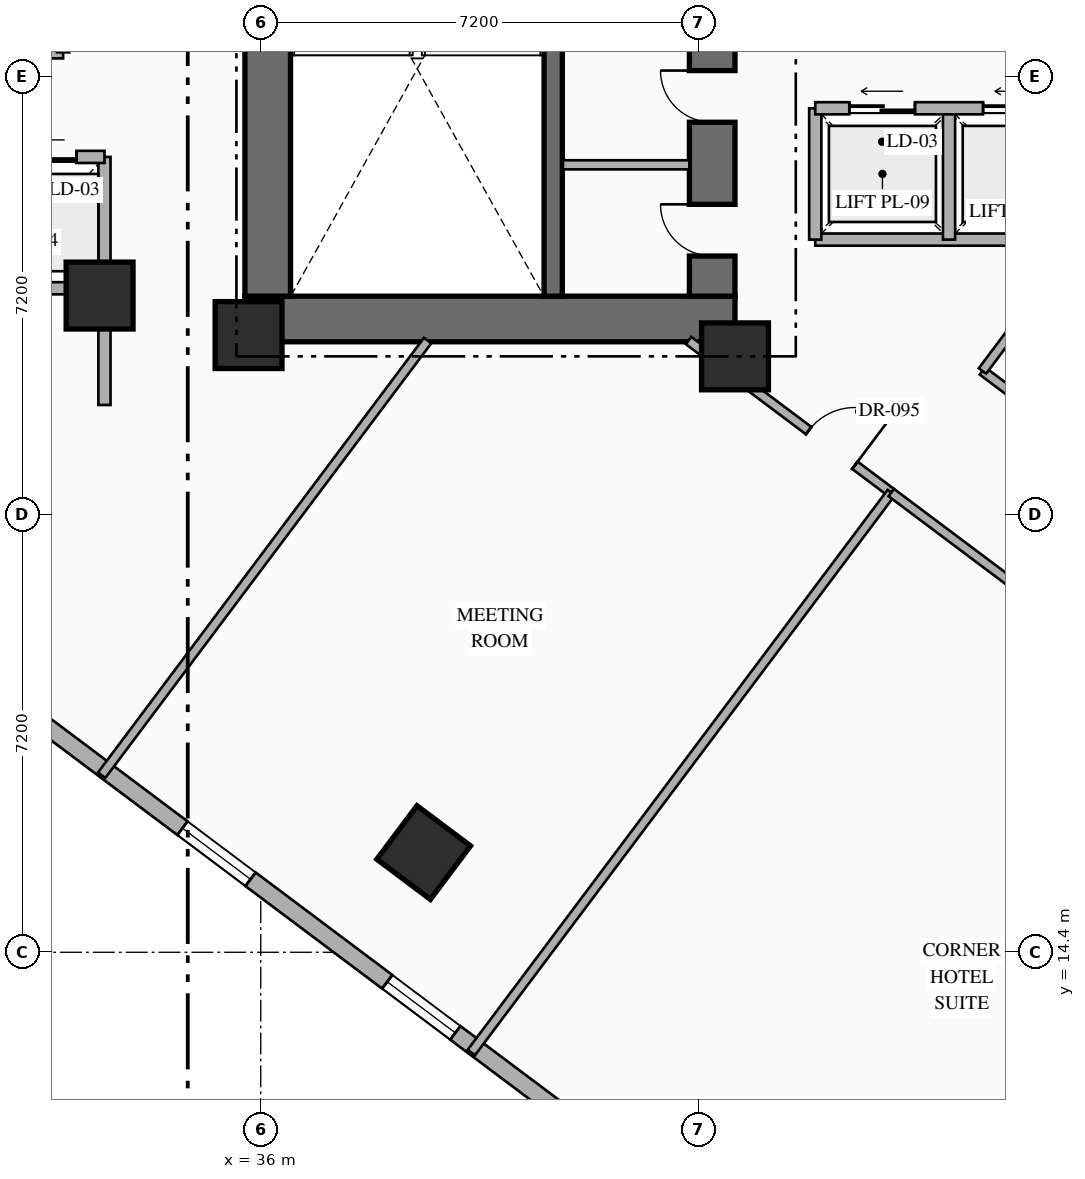
"""IFC4 building model, lengths in metres.
Left out: names, types, materials, properties, quantities, classifications, styles, units other than length and angle.
Written with IfcOpenShell. Run it as: python <this file> out.ifc"""

import sys

from ifc_helpers import new_model, si_unit, direction, frame, frame_2d, origin, origin_2d, place, context, subcontext, project, spatial, rectangle, hollow_rectangle, extrude, element, fill, save


model = new_model("IFC4")
c1 = context("Model", 3, precision=1e-05, world=origin(), true_north=direction((0.0, 1.0)))
c2 = subcontext(c1, "Body", "Model", "MODEL_VIEW")
j1 = project(units=[si_unit("LENGTHUNIT", "METRE"), si_unit("PLANEANGLEUNIT", "RADIAN")], contexts=[c1])
p1 = place(None, origin())
s1 = spatial("IfcSite", under=j1, at=p1, CompositionType="ELEMENT")
p2 = place(p1, origin())
s2 = spatial("IfcBuilding", under=s1, at=p2, CompositionType="ELEMENT")
p3 = place(p2, frame((0.0, 0.0, 60.05)))
s3 = spatial("IfcBuildingStorey", under=s2, at=p3, CompositionType="ELEMENT", Elevation=60.05)
p4 = place(p3, frame((35.74, 24.815, 0.0), z_axis=(0.0, 0.0, 1.0), x_axis=(1.0, 0.0, 0.0)))
e1 = element("IfcWall", 1, at=p4, inside=s3, PredefinedType="SHEAR", context=c2, shape_type="SweptSolid", body=[
    extrude(rectangle(XDim=8.06, YDim=0.75, at=frame_2d((4.03, 0.0))), origin(), (0.0, 0.0, 1.0), 3.35),
])
p5 = place(p3, frame((36.115, 25.19, 0.0), z_axis=(0.0, 0.0, 1.0), x_axis=(0.0, 1.0, 0.0)))
e2 = element("IfcWall", 2, at=p5, inside=s3, PredefinedType="SHEAR", context=c2, shape_type="SweptSolid", body=[
    extrude(rectangle(XDim=9.48, YDim=0.75, at=frame_2d((4.74, 0.0))), origin(), (0.0, 0.0, 1.0), 3.35),
])
p6 = place(p3, frame((43.425, 25.19, 0.0), z_axis=(0.0, 0.0, 1.0), x_axis=(0.0, 1.0, 0.0)))
e3 = element("IfcWall", 3, at=p6, inside=s3, PredefinedType="SHEAR", context=c2, shape_type="SweptSolid", body=[
    extrude(rectangle(XDim=9.48, YDim=0.75, at=frame_2d((4.74, 0.0))), origin(), (0.0, 0.0, 1.0), 3.35),
])
p7 = place(p6, frame((0.66, 0.0, 0.0)))
e4 = element("IfcOpeningElement", 4, at=p7, cuts=e3, PredefinedType="OPENING", context=c2, shape_type="SweptSolid", body=[
    extrude(rectangle(XDim=0.85, YDim=2.08, at=frame_2d((0.425, 1.04))), frame((0.0, 0.385, 0.0), z_axis=(0.0, -1.0, 0.0), x_axis=(1.0, 0.0, 0.0)), (0.0, 0.0, 1.0), 0.77),
])
p8 = place(p6, frame((2.86, 0.0, 0.0)))
e5 = element("IfcOpeningElement", 5, at=p8, cuts=e3, PredefinedType="OPENING", context=c2, shape_type="SweptSolid", body=[
    extrude(rectangle(XDim=0.85, YDim=2.08, at=frame_2d((0.425, 1.04))), frame((0.0, 0.385, 0.0), z_axis=(0.0, -1.0, 0.0), x_axis=(1.0, 0.0, 0.0)), (0.0, 0.0, 1.0), 0.77),
])
p9 = place(p6, frame((5.01, 0.0, 0.0)))
e6 = element("IfcOpeningElement", 6, at=p9, cuts=e3, PredefinedType="OPENING", context=c2, shape_type="SweptSolid", body=[
    extrude(rectangle(XDim=0.85, YDim=2.08, at=frame_2d((0.425, 1.04))), frame((0.0, 0.385, 0.0), z_axis=(0.0, -1.0, 0.0), x_axis=(1.0, 0.0, 0.0)), (0.0, 0.0, 1.0), 0.77),
])
p10 = place(p3, frame((40.81, 25.19, 0.0), z_axis=(0.0, 0.0, 1.0), x_axis=(0.0, 1.0, 0.0)))
e7 = element("IfcWall", 7, at=p10, inside=s3, PredefinedType="SHEAR", context=c2, shape_type="SweptSolid", body=[
    extrude(rectangle(XDim=9.48, YDim=0.3, at=frame_2d((4.74, 0.0))), origin(), (0.0, 0.0, 1.0), 3.35),
])
for number, where, z_axis, x_axis in (
    (8, (35.8, 24.55, 0.0), (0.0, 0.0, 1.0), (1.0, 0.0, 0.0)),
    (9, (43.8, 24.2, 0.0), (0.0, 0.0, 1.0), (1.0, 0.0, 0.0)),
):
    element("IfcColumn", number, at=place(p3, frame(where, z_axis=z_axis, x_axis=x_axis)), inside=s3, PredefinedType="COLUMN", context=c2, shape_type="SweptSolid", body=[
        extrude(rectangle(XDim=1.1, YDim=1.1, at=origin_2d()), origin(), (0.0, 0.0, 1.0), 3.35),
    ])
for number, where, z_axis, x_axis in (
    (10, (33.35, 25.2, 0.0), (0.0, 0.0, 1.0), (1.0, 0.0, 0.0)),
    (11, (38.68, 16.04, 0.0), (0.0, 0.0, 1.0), (0.8, -0.6, 0.0)),
):
    element("IfcColumn", number, at=place(p3, frame(where, z_axis=z_axis, x_axis=x_axis)), inside=s3, PredefinedType="COLUMN", context=c2, shape_type="SweptSolid", body=[
        extrude(hollow_rectangle(XDim=1.1, YDim=1.1, WallThickness=0.04, at=origin_2d()), origin(), (0.0, 0.0, 1.0), 3.35),
    ])
p11 = place(p3, frame((44.86, 40.73, 0.0), z_axis=(0.0, 0.0, 1.0), x_axis=(0.800006902154, -0.599990797017, 0.0)))
e12 = element("IfcWall", 12, at=p11, inside=s3, PredefinedType="STANDARD", context=c2, shape_type="SweptSolid", body=[
    extrude(rectangle(XDim=29.712, YDim=0.28, at=frame_2d((14.856, 0.0))), origin(), (0.0, 0.0, 1.0), 3.13),
])
p12 = place(p11, frame((14.249, 0.0, 0.0)))
e13 = element("IfcOpeningElement", 13, at=p12, cuts=e12, PredefinedType="OPENING", context=c2, shape_type="SweptSolid", body=[
    extrude(rectangle(XDim=1.1, YDim=2.2, at=frame_2d((0.55, 1.1))), frame((0.0, 0.15, 0.0), z_axis=(0.0, -1.0, 0.0), x_axis=(1.0, 0.0, 0.0)), (0.0, 0.0, 1.0), 0.3),
])
p13 = place(p11, frame((1.612, 0.0, 0.85)))
e14 = element("IfcOpeningElement", 14, at=p13, cuts=e12, PredefinedType="OPENING", context=c2, shape_type="SweptSolid", body=[
    extrude(rectangle(XDim=1.4, YDim=1.8, at=frame_2d((0.7, 0.9))), frame((0.0, 0.15, 0.0), z_axis=(0.0, -1.0, 0.0), x_axis=(1.0, 0.0, 0.0)), (0.0, 0.0, 1.0), 0.3),
])
p14 = place(p11, frame((5.667, 0.0, 0.85)))
e15 = element("IfcOpeningElement", 15, at=p14, cuts=e12, PredefinedType="OPENING", context=c2, shape_type="SweptSolid", body=[
    extrude(rectangle(XDim=1.4, YDim=1.8, at=frame_2d((0.7, 0.9))), frame((0.0, 0.15, 0.0), z_axis=(0.0, -1.0, 0.0), x_axis=(1.0, 0.0, 0.0)), (0.0, 0.0, 1.0), 0.3),
])
p15 = place(p11, frame((9.912, 0.0, 0.85)))
e16 = element("IfcOpeningElement", 16, at=p15, cuts=e12, PredefinedType="OPENING", context=c2, shape_type="SweptSolid", body=[
    extrude(rectangle(XDim=1.4, YDim=1.8, at=frame_2d((0.7, 0.9))), frame((0.0, 0.15, 0.0), z_axis=(0.0, -1.0, 0.0), x_axis=(1.0, 0.0, 0.0)), (0.0, 0.0, 1.0), 0.3),
])
p16 = place(p11, frame((18.803, 0.0, 0.85)))
e17 = element("IfcOpeningElement", 17, at=p16, cuts=e12, PredefinedType="OPENING", context=c2, shape_type="SweptSolid", body=[
    extrude(rectangle(XDim=1.4, YDim=1.8, at=frame_2d((0.7, 0.9))), frame((0.0, 0.15, 0.0), z_axis=(0.0, -1.0, 0.0), x_axis=(1.0, 0.0, 0.0)), (0.0, 0.0, 1.0), 0.3),
])
p17 = place(p11, frame((22.645, 0.0, 0.85)))
e18 = element("IfcOpeningElement", 18, at=p17, cuts=e12, PredefinedType="OPENING", context=c2, shape_type="SweptSolid", body=[
    extrude(rectangle(XDim=1.4, YDim=1.8, at=frame_2d((0.7, 0.9))), frame((0.0, 0.15, 0.0), z_axis=(0.0, -1.0, 0.0), x_axis=(1.0, 0.0, 0.0)), (0.0, 0.0, 1.0), 0.3),
])
p18 = place(p11, frame((27.668, 0.0, 0.85)))
e19 = element("IfcOpeningElement", 19, at=p18, cuts=e12, PredefinedType="OPENING", context=c2, shape_type="SweptSolid", body=[
    extrude(rectangle(XDim=1.4, YDim=1.8, at=frame_2d((0.7, 0.9))), frame((0.0, 0.15, 0.0), z_axis=(0.0, -1.0, 0.0), x_axis=(1.0, 0.0, 0.0)), (0.0, 0.0, 1.0), 0.3),
])
p19 = place(p3, frame((53.318, 2.487, 0.0), z_axis=(0.0, 0.0, 1.0), x_axis=(-0.800004174678, 0.599994433723, 0.0)))
e20 = element("IfcWall", 20, at=p19, inside=s3, PredefinedType="STANDARD", context=c2, shape_type="SweptSolid", body=[
    extrude(rectangle(XDim=35.089, YDim=0.28, at=frame_2d((17.544, 0.0))), origin(), (0.0, 0.0, 1.0), 3.13),
])
p20 = place(p19, frame((1.931, 0.0, 0.85)))
e21 = element("IfcOpeningElement", 21, at=p20, cuts=e20, PredefinedType="OPENING", context=c2, shape_type="SweptSolid", body=[
    extrude(rectangle(XDim=1.4, YDim=1.8, at=frame_2d((0.7, 0.9))), frame((0.0, 0.15, 0.0), z_axis=(0.0, -1.0, 0.0), x_axis=(1.0, 0.0, 0.0)), (0.0, 0.0, 1.0), 0.3),
])
p21 = place(p19, frame((6.819, 0.0, 0.85)))
e22 = element("IfcOpeningElement", 22, at=p21, cuts=e20, PredefinedType="OPENING", context=c2, shape_type="SweptSolid", body=[
    extrude(rectangle(XDim=1.4, YDim=1.8, at=frame_2d((0.7, 0.9))), frame((0.0, 0.15, 0.0), z_axis=(0.0, -1.0, 0.0), x_axis=(1.0, 0.0, 0.0)), (0.0, 0.0, 1.0), 0.3),
])
p22 = place(p19, frame((11.832, 0.0, 0.85)))
e23 = element("IfcOpeningElement", 23, at=p22, cuts=e20, PredefinedType="OPENING", context=c2, shape_type="SweptSolid", body=[
    extrude(rectangle(XDim=1.4, YDim=1.8, at=frame_2d((0.7, 0.9))), frame((0.0, 0.15, 0.0), z_axis=(0.0, -1.0, 0.0), x_axis=(1.0, 0.0, 0.0)), (0.0, 0.0, 1.0), 0.3),
])
p23 = place(p19, frame((17.647, 0.0, 0.85)))
e24 = element("IfcOpeningElement", 24, at=p23, cuts=e20, PredefinedType="OPENING", context=c2, shape_type="SweptSolid", body=[
    extrude(rectangle(XDim=1.4, YDim=1.8, at=frame_2d((0.7, 0.9))), frame((0.0, 0.15, 0.0), z_axis=(0.0, -1.0, 0.0), x_axis=(1.0, 0.0, 0.0)), (0.0, 0.0, 1.0), 0.3),
])
p24 = place(p19, frame((21.857, 0.0, 0.85)))
e25 = element("IfcOpeningElement", 25, at=p24, cuts=e20, PredefinedType="OPENING", context=c2, shape_type="SweptSolid", body=[
    extrude(rectangle(XDim=1.4, YDim=1.8, at=frame_2d((0.7, 0.9))), frame((0.0, 0.15, 0.0), z_axis=(0.0, -1.0, 0.0), x_axis=(1.0, 0.0, 0.0)), (0.0, 0.0, 1.0), 0.3),
])
p25 = place(p19, frame((26.87, 0.0, 0.85)))
e26 = element("IfcOpeningElement", 26, at=p25, cuts=e20, PredefinedType="OPENING", context=c2, shape_type="SweptSolid", body=[
    extrude(rectangle(XDim=1.4, YDim=1.8, at=frame_2d((0.7, 0.9))), frame((0.0, 0.15, 0.0), z_axis=(0.0, -1.0, 0.0), x_axis=(1.0, 0.0, 0.0)), (0.0, 0.0, 1.0), 0.3),
])
p26 = place(p19, frame((31.757, 0.0, 0.85)))
e27 = element("IfcOpeningElement", 27, at=p26, cuts=e20, PredefinedType="OPENING", context=c2, shape_type="SweptSolid", body=[
    extrude(rectangle(XDim=1.4, YDim=1.8, at=frame_2d((0.7, 0.9))), frame((0.0, 0.15, 0.0), z_axis=(0.0, -1.0, 0.0), x_axis=(1.0, 0.0, 0.0)), (0.0, 0.0, 1.0), 0.3),
])
p27 = place(p3, frame((40.97, 27.35, 0.0), z_axis=(0.0, 0.0, 1.0), x_axis=(1.0, 0.0, 0.0)))
e28 = element("IfcWall", 28, at=p27, inside=s3, PredefinedType="PARTITIONING", context=c2, shape_type="SweptSolid", body=[
    extrude(rectangle(XDim=2.08, YDim=0.15, at=frame_2d((1.04, 0.0))), origin(), (0.0, 0.0, 1.0), 3.13),
])
p28 = place(p3, frame((27.6, 29.2, 0.0), z_axis=(0.0, 0.0, 1.0), x_axis=(1.0, 0.0, 0.0)))
e29 = element("IfcWall", 29, at=p28, inside=s3, PredefinedType="STANDARD", context=c2, shape_type="SweptSolid", body=[
    extrude(rectangle(XDim=5.15, YDim=0.2, at=frame_2d((2.575, 0.0))), origin(), (0.0, 0.0, 1.0), 3.13),
])
p29 = place(p3, frame((33.43, 23.4, 0.0), z_axis=(0.0, 0.0, 1.0), x_axis=(0.0, 1.0, 0.0)))
e30 = element("IfcWall", 30, at=p29, inside=s3, PredefinedType="STANDARD", context=c2, shape_type="SweptSolid", body=[
    extrude(rectangle(XDim=4.08, YDim=0.2, at=frame_2d((2.04, 0.0))), origin(), (0.0, 0.0, 1.0), 2.425),
])
p30 = place(p3, frame((25.55, 25.32, 0.0), z_axis=(0.0, 0.0, 1.0), x_axis=(1.0, 0.0, 0.0)))
e31 = element("IfcWall", 31, at=p30, inside=s3, PredefinedType="STANDARD", context=c2, shape_type="SweptSolid", body=[
    extrude(rectangle(XDim=7.88, YDim=0.2, at=frame_2d((3.94, 0.0))), origin(), (0.0, 0.0, 1.0), 2.525),
])
p31 = place(p3, frame((25.55, 27.48, 0.0), z_axis=(0.0, 0.0, 1.0), x_axis=(1.0, 0.0, 0.0)))
e32 = element("IfcWall", 32, at=p31, inside=s3, PredefinedType="STANDARD", context=c2, shape_type="SweptSolid", body=[
    extrude(rectangle(XDim=7.88, YDim=0.2, at=frame_2d((3.94, 0.0))), origin(), (0.0, 0.0, 1.0), 3.13),
])
p32 = place(p31, frame((0.46, 0.0, 0.0)))
e33 = element("IfcOpeningElement", 33, at=p32, cuts=e32, PredefinedType="OPENING", context=c2, shape_type="SweptSolid", body=[
    extrude(rectangle(XDim=1.08, YDim=2.15, at=frame_2d((0.54, 1.075))), frame((0.0, 0.11, 0.0), z_axis=(0.0, -1.0, 0.0), x_axis=(1.0, 0.0, 0.0)), (0.0, 0.0, 1.0), 0.22),
])
p33 = place(p31, frame((2.42, 0.0, 0.0)))
e34 = element("IfcOpeningElement", 34, at=p33, cuts=e32, PredefinedType="OPENING", context=c2, shape_type="SweptSolid", body=[
    extrude(rectangle(XDim=1.08, YDim=2.15, at=frame_2d((0.54, 1.075))), frame((0.0, 0.11, 0.0), z_axis=(0.0, -1.0, 0.0), x_axis=(1.0, 0.0, 0.0)), (0.0, 0.0, 1.0), 0.22),
])
p34 = place(p31, frame((4.38, 0.0, 0.0)))
e35 = element("IfcOpeningElement", 35, at=p34, cuts=e32, PredefinedType="OPENING", context=c2, shape_type="SweptSolid", body=[
    extrude(rectangle(XDim=1.08, YDim=2.15, at=frame_2d((0.54, 1.075))), frame((0.0, 0.11, 0.0), z_axis=(0.0, -1.0, 0.0), x_axis=(1.0, 0.0, 0.0)), (0.0, 0.0, 1.0), 0.22),
])
p35 = place(p31, frame((6.34, 0.0, 0.0)))
e36 = element("IfcOpeningElement", 36, at=p35, cuts=e32, PredefinedType="OPENING", context=c2, shape_type="SweptSolid", body=[
    extrude(rectangle(XDim=1.08, YDim=2.15, at=frame_2d((0.54, 1.075))), frame((0.0, 0.11, 0.0), z_axis=(0.0, -1.0, 0.0), x_axis=(1.0, 0.0, 0.0)), (0.0, 0.0, 1.0), 0.22),
])
p36 = place(p3, frame((45.12, 26.12, 0.0), z_axis=(0.0, 0.0, 1.0), x_axis=(1.0, 0.0, 0.0)))
e37 = element("IfcWall", 37, at=p36, inside=s3, PredefinedType="STANDARD", context=c2, shape_type="SweptSolid", body=[
    extrude(rectangle(XDim=4.4, YDim=0.2, at=frame_2d((2.2, 0.0))), origin(), (0.0, 0.0, 1.0), 3.13),
])
for number, where, z_axis, x_axis in (
    (38, (45.12, 26.12, 0.0), (0.0, 0.0, 1.0), (0.0, 1.0, 0.0)),
    (39, (47.32, 26.12, 0.0), (0.0, 0.0, 1.0), (0.0, 1.0, 0.0)),
):
    element("IfcWall", number, at=place(p3, frame(where, z_axis=z_axis, x_axis=x_axis)), inside=s3, PredefinedType="STANDARD", context=c2, shape_type="SweptSolid", body=[
        extrude(rectangle(XDim=2.16, YDim=0.2, at=frame_2d((1.08, 0.0))), origin(), (0.0, 0.0, 1.0), 3.13),
    ])
p37 = place(p3, frame((45.12, 28.28, 0.0), z_axis=(0.0, 0.0, 1.0), x_axis=(1.0, 0.0, 0.0)))
e40 = element("IfcWall", 40, at=p37, inside=s3, PredefinedType="STANDARD", context=c2, shape_type="SweptSolid", body=[
    extrude(rectangle(XDim=4.4, YDim=0.2, at=frame_2d((2.2, 0.0))), origin(), (0.0, 0.0, 1.0), 3.13),
])
p38 = place(p37, frame((0.56, 0.0, 0.0)))
e41 = element("IfcOpeningElement", 41, at=p38, cuts=e40, PredefinedType="OPENING", context=c2, shape_type="SweptSolid", body=[
    extrude(rectangle(XDim=1.08, YDim=2.15, at=frame_2d((0.54, 1.075))), frame((0.0, 0.11, 0.0), z_axis=(0.0, -1.0, 0.0), x_axis=(1.0, 0.0, 0.0)), (0.0, 0.0, 1.0), 0.22),
])
p39 = place(p37, frame((2.76, 0.0, 0.0)))
e42 = element("IfcOpeningElement", 42, at=p39, cuts=e40, PredefinedType="OPENING", context=c2, shape_type="SweptSolid", body=[
    extrude(rectangle(XDim=1.08, YDim=2.15, at=frame_2d((0.54, 1.075))), frame((0.0, 0.11, 0.0), z_axis=(0.0, -1.0, 0.0), x_axis=(1.0, 0.0, 0.0)), (0.0, 0.0, 1.0), 0.22),
])
p40 = place(p3, frame((43.037, 24.46, 0.0), z_axis=(0.0, 0.0, 1.0), x_axis=(0.799971872363, -0.600037501685, 0.0)))
e43 = element("IfcWall", 43, at=p40, inside=s3, PredefinedType="PARTITIONING", context=c2, shape_type="SweptSolid", body=[
    extrude(rectangle(XDim=4.167, YDim=0.15, at=frame_2d((2.083, 0.0))), origin(), (0.0, 0.0, 1.0), 2.425),
])
p41 = place(p40, frame((2.468, 0.0, 0.0)))
e44 = element("IfcOpeningElement", 44, at=p41, cuts=e43, PredefinedType="OPENING", context=c2, shape_type="SweptSolid", body=[
    extrude(rectangle(XDim=0.95, YDim=2.15, at=frame_2d((0.475, 1.075))), frame((0.0, 0.085, 0.0), z_axis=(0.0, -1.0, 0.0), x_axis=(1.0, 0.0, 0.0)), (0.0, 0.0, 1.0), 0.17),
])
p42 = place(p3, frame((33.384, 17.312, 0.0), z_axis=(0.0, 0.0, 1.0), x_axis=(0.600008743659, 0.799993442181, 0.0)))
e45 = element("IfcWall", 45, at=p42, inside=s3, PredefinedType="PARTITIONING", context=c2, shape_type="SweptSolid", body=[
    extrude(rectangle(XDim=8.935, YDim=0.15, at=frame_2d((4.468, 0.0))), origin(), (0.0, 0.0, 1.0), 3.13),
])
p43 = place(p3, frame((39.464, 12.752, 0.0), z_axis=(0.0, 0.0, 1.0), x_axis=(0.6, 0.8, 0.0)))
e46 = element("IfcWall", 46, at=p43, inside=s3, PredefinedType="PARTITIONING", context=c2, shape_type="SweptSolid", body=[
    extrude(rectangle(XDim=11.51, YDim=0.15, at=frame_2d((5.755, 0.0))), origin(), (0.0, 0.0, 1.0), 3.13),
])
p44 = place(p3, frame((47.87, 23.96, 0.0), z_axis=(0.0, 0.0, 1.0), x_axis=(0.8, -0.6, 0.0)))
e47 = element("IfcWall", 47, at=p44, inside=s3, PredefinedType="PARTITIONING", context=c2, shape_type="SweptSolid", body=[
    extrude(rectangle(XDim=2.25, YDim=0.15, at=frame_2d((1.125, 0.0))), origin(), (0.0, 0.0, 1.0), 2.775),
])
p45 = place(p44, frame((0.65, 0.0, 0.0)))
e48 = element("IfcOpeningElement", 48, at=p45, cuts=e47, PredefinedType="OPENING", context=c2, shape_type="SweptSolid", body=[
    extrude(rectangle(XDim=0.95, YDim=2.15, at=frame_2d((0.475, 1.075))), frame((0.0, 0.085, 0.0), z_axis=(0.0, -1.0, 0.0), x_axis=(1.0, 0.0, 0.0)), (0.0, 0.0, 1.0), 0.17),
])
p46 = place(p3, frame((47.87, 23.96, 0.0), z_axis=(0.0, 0.0, 1.0), x_axis=(0.599996617946, 0.80000253653, 0.0)))
e49 = element("IfcWall", 49, at=p46, inside=s3, PredefinedType="PARTITIONING", context=c2, shape_type="SweptSolid", body=[
    extrude(rectangle(XDim=11.55, YDim=0.15, at=frame_2d((5.775, 0.0))), origin(), (0.0, 0.0, 1.0), 3.13),
])
p47 = place(p3, frame((46.37, 21.96, 0.0), z_axis=(0.0, 0.0, 1.0), x_axis=(0.799997249048, -0.600003667918, 0.0)))
e50 = element("IfcWall", 50, at=p47, inside=s3, PredefinedType="PARTITIONING", context=c2, shape_type="SweptSolid", body=[
    extrude(rectangle(XDim=10.65, YDim=0.15, at=frame_2d((5.325, 0.0))), origin(), (0.0, 0.0, 1.0), 2.425),
])
p48 = place(p47, frame((3.062, 0.0, 0.0)))
e51 = element("IfcOpeningElement", 51, at=p48, cuts=e50, PredefinedType="OPENING", context=c2, shape_type="SweptSolid", body=[
    extrude(rectangle(XDim=0.95, YDim=2.15, at=frame_2d((0.475, 1.075))), frame((0.0, 0.085, 0.0), z_axis=(0.0, -1.0, 0.0), x_axis=(1.0, 0.0, 0.0)), (0.0, 0.0, 1.0), 0.17),
])
p49 = place(p23, origin())
e52 = element("IfcWindow", 52, at=p49, inside=s3, PartitioningType="SINGLE_PANEL", PredefinedType="WINDOW", context=c2, shape_type="SweptSolid", body=[
    extrude(rectangle(XDim=1.4, YDim=1.8, at=frame_2d((0.7, 0.9))), frame((0.0, 0.03, 0.0), z_axis=(0.0, -1.0, 0.0), x_axis=(1.0, 0.0, 0.0)), (0.0, 0.0, 1.0), 0.06),
])
fill(e24, e52)
p50 = place(p24, origin())
e53 = element("IfcWindow", 53, at=p50, inside=s3, PartitioningType="SINGLE_PANEL", PredefinedType="WINDOW", context=c2, shape_type="SweptSolid", body=[
    extrude(rectangle(XDim=1.4, YDim=1.8, at=frame_2d((0.7, 0.9))), frame((0.0, 0.03, 0.0), z_axis=(0.0, -1.0, 0.0), x_axis=(1.0, 0.0, 0.0)), (0.0, 0.0, 1.0), 0.06),
])
fill(e25, e53)
p51 = place(p7, origin())
e54 = element("IfcDoor", 54, at=p51, inside=s3, OperationType="SINGLE_SWING_RIGHT", PredefinedType="DOOR", context=c2, shape_type="SweptSolid", body=[
    extrude(rectangle(XDim=0.85, YDim=2.08, at=frame_2d((0.425, 1.04))), frame((0.0, 0.025, 0.0), z_axis=(0.0, -1.0, 0.0), x_axis=(1.0, 0.0, 0.0)), (0.0, 0.0, 1.0), 0.05),
])
fill(e4, e54)
p52 = place(p8, origin())
e55 = element("IfcDoor", 55, at=p52, inside=s3, OperationType="SINGLE_SWING_RIGHT", PredefinedType="DOOR", context=c2, shape_type="SweptSolid", body=[
    extrude(rectangle(XDim=0.85, YDim=2.08, at=frame_2d((0.425, 1.04))), frame((0.0, 0.025, 0.0), z_axis=(0.0, -1.0, 0.0), x_axis=(1.0, 0.0, 0.0)), (0.0, 0.0, 1.0), 0.05),
])
fill(e5, e55)
p53 = place(p35, origin())
e56 = element("IfcDoor", 56, at=p53, inside=s3, OperationType="SLIDING_TO_LEFT", PredefinedType="USERDEFINED", context=c2, shape_type="SweptSolid", body=[
    extrude(rectangle(XDim=1.08, YDim=2.15, at=frame_2d((0.54, 1.075))), frame((0.0, 0.025, 0.0), z_axis=(0.0, -1.0, 0.0), x_axis=(1.0, 0.0, 0.0)), (0.0, 0.0, 1.0), 0.05),
])
fill(e36, e56)
p54 = place(p38, origin())
e57 = element("IfcDoor", 57, at=p54, inside=s3, OperationType="SLIDING_TO_LEFT", PredefinedType="USERDEFINED", context=c2, shape_type="SweptSolid", body=[
    extrude(rectangle(XDim=1.08, YDim=2.15, at=frame_2d((0.54, 1.075))), frame((0.0, 0.025, 0.0), z_axis=(0.0, -1.0, 0.0), x_axis=(1.0, 0.0, 0.0)), (0.0, 0.0, 1.0), 0.05),
])
fill(e41, e57)
p55 = place(p39, origin())
e58 = element("IfcDoor", 58, at=p55, inside=s3, OperationType="SLIDING_TO_LEFT", PredefinedType="USERDEFINED", context=c2, shape_type="SweptSolid", body=[
    extrude(rectangle(XDim=1.08, YDim=2.15, at=frame_2d((0.54, 1.075))), frame((0.0, 0.025, 0.0), z_axis=(0.0, -1.0, 0.0), x_axis=(1.0, 0.0, 0.0)), (0.0, 0.0, 1.0), 0.05),
])
fill(e42, e58)
p56 = place(p41, origin())
e59 = element("IfcDoor", 59, at=p56, inside=s3, OperationType="SINGLE_SWING_RIGHT", PredefinedType="DOOR", context=c2, shape_type="SweptSolid", body=[
    extrude(rectangle(XDim=0.95, YDim=2.15, at=frame_2d((0.475, 1.075))), frame((0.0, 0.025, 0.0), z_axis=(0.0, -1.0, 0.0), x_axis=(1.0, 0.0, 0.0)), (0.0, 0.0, 1.0), 0.05),
])
fill(e44, e59)
save(model, sys.argv[1])
